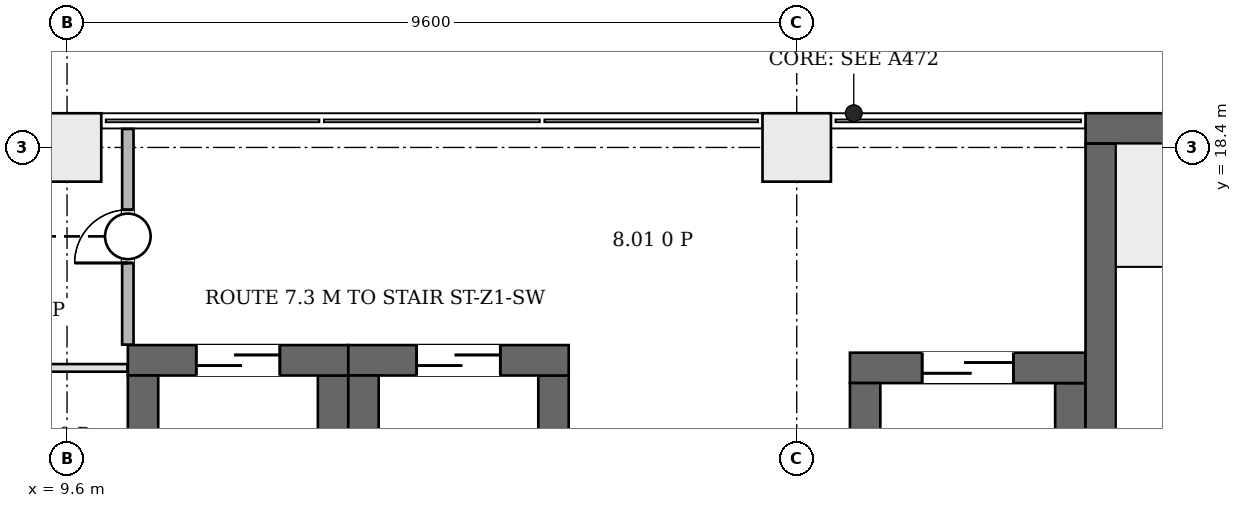
"""IFC4 building model, lengths in metres.
Left out: names, types, materials, properties, quantities, classifications, styles, units other than length and angle.
Written with IfcOpenShell. Run it as: python <this file> out.ifc"""

import sys

from ifc_helpers import new_model, si_unit, direction, frame, frame_2d, origin, origin_2d, place, context, subcontext, project, spatial, rectangle, extrude, element, fill, save


model = new_model("IFC4")
c1 = context("Model", 3, precision=1e-05, world=origin(), true_north=direction((0.0, 1.0)))
c2 = subcontext(c1, "Body", "Model", "MODEL_VIEW")
j1 = project(units=[si_unit("LENGTHUNIT", "METRE"), si_unit("PLANEANGLEUNIT", "RADIAN")], contexts=[c1])
p1 = place(None, origin())
s1 = spatial("IfcSite", under=j1, at=p1, CompositionType="ELEMENT")
p2 = place(p1, origin())
s2 = spatial("IfcBuilding", under=s1, at=p2, CompositionType="ELEMENT")
p3 = place(p2, frame((0.0, 0.0, 44.5)))
s3 = spatial("IfcBuildingStorey", under=s2, at=p3, CompositionType="ELEMENT", Elevation=44.5)
p4 = place(p3, frame((23.0, 18.65, 0.0), z_axis=(0.0, 0.0, 1.0), x_axis=(1.0, 0.0, 0.0)))
e1 = element("IfcWall", 1, at=p4, inside=s3, PredefinedType="SHEAR", context=c2, shape_type="SweptSolid", body=[
    extrude(rectangle(XDim=4.2, YDim=0.4, at=frame_2d((2.1, 0.0))), origin(), (0.0, 0.0, 1.0), 4.2),
])
p5 = place(p3, frame((23.2, 11.85, 0.0), z_axis=(0.0, 0.0, 1.0), x_axis=(0.0, 1.0, 0.0)))
e2 = element("IfcWall", 2, at=p5, inside=s3, PredefinedType="SHEAR", context=c2, shape_type="SweptSolid", body=[
    extrude(rectangle(XDim=6.6, YDim=0.4, at=frame_2d((3.3, 0.0))), origin(), (0.0, 0.0, 1.0), 4.2),
])
p6 = place(p3, frame((10.4, 15.6, 0.0), z_axis=(0.0, 0.0, 1.0), x_axis=(1.0, 0.0, 0.0)))
e3 = element("IfcWall", 3, at=p6, inside=s3, PredefinedType="SHEAR", context=c2, shape_type="SweptSolid", body=[
    extrude(rectangle(XDim=2.9, YDim=0.4, at=frame_2d((1.45, 0.0))), origin(), (0.0, 0.0, 1.0), 4.2),
])
p7 = place(p6, frame((0.9, 0.0, 0.0)))
e4 = element("IfcOpeningElement", 4, at=p7, cuts=e3, PredefinedType="OPENING", context=c2, shape_type="SweptSolid", body=[
    extrude(rectangle(XDim=1.1, YDim=2.1, at=frame_2d((0.55, 1.05))), frame((0.0, 0.21, 0.0), z_axis=(0.0, -1.0, 0.0), x_axis=(1.0, 0.0, 0.0)), (0.0, 0.0, 1.0), 0.42),
])
for number, where, z_axis, x_axis in (
    (5, (10.6, 12.4, 0.0), (0.0, 0.0, 1.0), (0.0, 1.0, 0.0)),
    (6, (13.1, 12.4, 0.0), (0.0, 0.0, 1.0), (0.0, 1.0, 0.0)),
):
    element("IfcWall", number, at=place(p3, frame(where, z_axis=z_axis, x_axis=x_axis)), inside=s3, PredefinedType="SHEAR", context=c2, shape_type="SweptSolid", body=[
        extrude(rectangle(XDim=3.0, YDim=0.4, at=frame_2d((1.5, 0.0))), origin(), (0.0, 0.0, 1.0), 4.2),
    ])
p8 = place(p3, frame((13.3, 15.6, 0.0), z_axis=(0.0, 0.0, 1.0), x_axis=(1.0, 0.0, 0.0)))
e7 = element("IfcWall", 7, at=p8, inside=s3, PredefinedType="SHEAR", context=c2, shape_type="SweptSolid", body=[
    extrude(rectangle(XDim=2.9, YDim=0.4, at=frame_2d((1.45, 0.0))), origin(), (0.0, 0.0, 1.0), 4.2),
])
p9 = place(p8, frame((0.9, 0.0, 0.0)))
e8 = element("IfcOpeningElement", 8, at=p9, cuts=e7, PredefinedType="OPENING", context=c2, shape_type="SweptSolid", body=[
    extrude(rectangle(XDim=1.1, YDim=2.1, at=frame_2d((0.55, 1.05))), frame((0.0, 0.21, 0.0), z_axis=(0.0, -1.0, 0.0), x_axis=(1.0, 0.0, 0.0)), (0.0, 0.0, 1.0), 0.42),
])
for number, where, z_axis, x_axis in (
    (9, (13.5, 12.4, 0.0), (0.0, 0.0, 1.0), (0.0, 1.0, 0.0)),
    (10, (16.0, 12.4, 0.0), (0.0, 0.0, 1.0), (0.0, 1.0, 0.0)),
):
    element("IfcWall", number, at=place(p3, frame(where, z_axis=z_axis, x_axis=x_axis)), inside=s3, PredefinedType="SHEAR", context=c2, shape_type="SweptSolid", body=[
        extrude(rectangle(XDim=3.0, YDim=0.4, at=frame_2d((1.5, 0.0))), origin(), (0.0, 0.0, 1.0), 4.2),
    ])
p10 = place(p3, frame((19.9, 15.5, 0.0), z_axis=(0.0, 0.0, 1.0), x_axis=(1.0, 0.0, 0.0)))
e11 = element("IfcWall", 11, at=p10, inside=s3, PredefinedType="SHEAR", context=c2, shape_type="SweptSolid", body=[
    extrude(rectangle(XDim=3.1, YDim=0.4, at=frame_2d((1.55, 0.0))), origin(), (0.0, 0.0, 1.0), 4.2),
])
p11 = place(p10, frame((0.95, 0.0, 0.0)))
e12 = element("IfcOpeningElement", 12, at=p11, cuts=e11, PredefinedType="OPENING", context=c2, shape_type="SweptSolid", body=[
    extrude(rectangle(XDim=1.2, YDim=2.1, at=frame_2d((0.6, 1.05))), frame((0.0, 0.21, 0.0), z_axis=(0.0, -1.0, 0.0), x_axis=(1.0, 0.0, 0.0)), (0.0, 0.0, 1.0), 0.42),
])
for number, where, z_axis, x_axis in (
    (13, (20.1, 11.9, 0.0), (0.0, 0.0, 1.0), (0.0, 1.0, 0.0)),
    (14, (22.8, 11.9, 0.0), (0.0, 0.0, 1.0), (0.0, 1.0, 0.0)),
):
    element("IfcWall", number, at=place(p3, frame(where, z_axis=z_axis, x_axis=x_axis)), inside=s3, PredefinedType="SHEAR", context=c2, shape_type="SweptSolid", body=[
        extrude(rectangle(XDim=3.4, YDim=0.4, at=frame_2d((1.7, 0.0))), origin(), (0.0, 0.0, 1.0), 4.2),
    ])
for number, where, z_axis, x_axis in (
    (15, (9.6, 18.4, 0.0), (0.0, 0.0, 1.0), (1.0, 0.0, 0.0)),
    (16, (19.2, 18.4, 0.0), (0.0, 0.0, 1.0), (1.0, 0.0, 0.0)),
):
    element("IfcColumn", number, at=place(p3, frame(where, z_axis=z_axis, x_axis=x_axis)), inside=s3, PredefinedType="COLUMN", context=c2, shape_type="SweptSolid", body=[
        extrude(rectangle(XDim=0.9, YDim=0.9, at=origin_2d()), origin(), (0.0, 0.0, 1.0), 4.2),
    ])
p12 = place(p3, frame((6.275, 15.5, 0.0), z_axis=(0.0, 0.0, 1.0), x_axis=(1.0, 0.0, 0.0)))
e17 = element("IfcWall", 17, at=p12, inside=s3, PredefinedType="PARTITIONING", context=c2, shape_type="SweptSolid", body=[
    extrude(rectangle(XDim=4.119, YDim=0.1, at=frame_2d((2.06, 0.0))), origin(), (0.0, 0.0, 1.0), 3.9),
])
p13 = place(p3, frame((10.4, 15.806, 0.0), z_axis=(0.0, 0.0, 1.0), x_axis=(0.0, 1.0, 0.0)))
e18 = element("IfcWall", 18, at=p13, inside=s3, PredefinedType="PARTITIONING", context=c2, shape_type="SweptSolid", body=[
    extrude(rectangle(XDim=2.838, YDim=0.15, at=frame_2d((1.419, 0.0))), origin(), (0.0, 0.0, 1.0), 3.9),
])
p14 = place(p13, frame((1.074, 0.0, 0.0)))
e19 = element("IfcOpeningElement", 19, at=p14, cuts=e18, PredefinedType="OPENING", context=c2, shape_type="SweptSolid", body=[
    extrude(rectangle(XDim=0.7, YDim=2.1, at=frame_2d((0.35, 1.05))), frame((0.0, 0.085, 0.0), z_axis=(0.0, -1.0, 0.0), x_axis=(1.0, 0.0, 0.0)), (0.0, 0.0, 1.0), 0.17),
])
p15 = place(p7, origin())
e20 = element("IfcDoor", 20, at=p15, inside=s3, OperationType="DOUBLE_DOOR_SLIDING", PredefinedType="DOOR", context=c2, shape_type="SweptSolid", body=[
    extrude(rectangle(XDim=1.1, YDim=2.1, at=frame_2d((0.55, 1.05))), frame((0.0, 0.025, 0.0), z_axis=(0.0, -1.0, 0.0), x_axis=(1.0, 0.0, 0.0)), (0.0, 0.0, 1.0), 0.05),
])
fill(e4, e20)
p16 = place(p9, origin())
e21 = element("IfcDoor", 21, at=p16, inside=s3, OperationType="DOUBLE_DOOR_SLIDING", PredefinedType="DOOR", context=c2, shape_type="SweptSolid", body=[
    extrude(rectangle(XDim=1.1, YDim=2.1, at=frame_2d((0.55, 1.05))), frame((0.0, 0.025, 0.0), z_axis=(0.0, -1.0, 0.0), x_axis=(1.0, 0.0, 0.0)), (0.0, 0.0, 1.0), 0.05),
])
fill(e8, e21)
p17 = place(p11, origin())
e22 = element("IfcDoor", 22, at=p17, inside=s3, OperationType="DOUBLE_DOOR_SLIDING", PredefinedType="DOOR", context=c2, shape_type="SweptSolid", body=[
    extrude(rectangle(XDim=1.2, YDim=2.1, at=frame_2d((0.6, 1.05))), frame((0.0, 0.025, 0.0), z_axis=(0.0, -1.0, 0.0), x_axis=(1.0, 0.0, 0.0)), (0.0, 0.0, 1.0), 0.05),
])
fill(e12, e22)
p18 = place(p14, origin())
e23 = element("IfcDoor", 23, at=p18, inside=s3, OperationType="SINGLE_SWING_LEFT", PredefinedType="DOOR", context=c2, shape_type="SweptSolid", body=[
    extrude(rectangle(XDim=0.7, YDim=2.1, at=frame_2d((0.35, 1.05))), frame((0.0, 0.025, 0.0), z_axis=(0.0, -1.0, 0.0), x_axis=(1.0, 0.0, 0.0)), (0.0, 0.0, 1.0), 0.05),
])
fill(e19, e23)
save(model, sys.argv[1])
